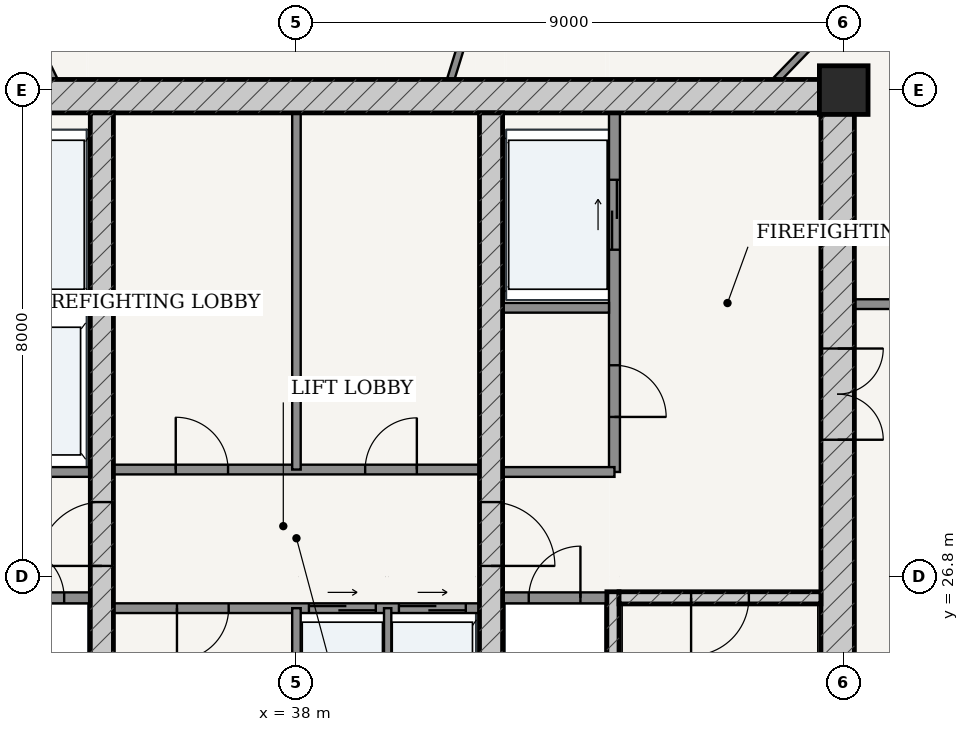
"""IFC4 building model, lengths in metres.
Left out: names, types, materials, properties, quantities, classifications, styles, units other than length and angle.
Written with IfcOpenShell. Run it as: python <this file> out.ifc"""

import sys

from ifc_helpers import new_model, si_unit, direction, frame, frame_2d, origin, origin_2d, place, context, subcontext, project, spatial, rectangle, extrude, source, transform, mapped, element, fill, save


model = new_model("IFC4")
c1 = context("Model", 3, precision=1e-05, world=origin(), true_north=direction((-0.2419218956, 0.970295726276)))
c2 = subcontext(c1, "Body", "Model", "MODEL_VIEW")
j1 = project(units=[si_unit("LENGTHUNIT", "METRE"), si_unit("PLANEANGLEUNIT", "RADIAN")], contexts=[c1])
p1 = place(None, origin())
s1 = spatial("IfcSite", under=j1, at=p1, CompositionType="ELEMENT")
p2 = place(p1, origin())
s2 = spatial("IfcBuilding", under=s1, at=p2, CompositionType="ELEMENT")
p3 = place(p2, frame((0.0, 0.0, 270.7)))
s3 = spatial("IfcBuildingStorey", under=s2, at=p3, CompositionType="ELEMENT", Elevation=270.7)
p4 = place(p3, frame((47.0, 34.8, 0.0), z_axis=(0.0, 0.0, 1.0), x_axis=(1.0, 0.0, 0.0)))
e1 = element("IfcColumn", 1, at=p4, inside=s3, PredefinedType="COLUMN", context=c2, shape_type="SweptSolid", body=[
    extrude(rectangle(XDim=0.8, YDim=0.8, at=origin_2d()), origin(), (0.0, 0.0, 1.0), 3.75),
])
p5 = place(p3, frame((28.825, 34.7, 0.0), z_axis=(0.0, 0.0, 1.0), x_axis=(1.0, 0.0, 0.0)))
e2 = element("IfcWall", 2, at=p5, inside=s3, PredefinedType="SHEAR", context=c2, shape_type="SweptSolid", body=[
    extrude(rectangle(XDim=18.35, YDim=0.55, at=frame_2d((9.175, 0.0))), origin(), (0.0, 0.0, 1.0), 3.49),
])
p6 = place(p3, frame((46.9, 19.175, 0.0), z_axis=(0.0, 0.0, 1.0), x_axis=(0.0, 1.0, 0.0)))
e3 = element("IfcWall", 3, at=p6, inside=s3, PredefinedType="SHEAR", context=c2, shape_type="SweptSolid", body=[
    extrude(rectangle(XDim=15.25, YDim=0.55, at=frame_2d((7.625, 0.0))), origin(), (0.0, 0.0, 1.0), 3.49),
])
p7 = place(p6, frame((9.875, 0.0, 0.0)))
e4 = element("IfcOpeningElement", 4, at=p7, cuts=e3, PredefinedType="OPENING", context=c2, shape_type="SweptSolid", body=[
    extrude(rectangle(XDim=1.5, YDim=2.2, at=frame_2d((0.75, 1.1))), frame((0.0, 0.285, 0.0), z_axis=(0.0, -1.0, 0.0), x_axis=(1.0, 0.0, 0.0)), (0.0, 0.0, 1.0), 0.57),
])
p8 = place(p3, frame((43.205, 19.175, 0.0), z_axis=(0.0, 0.0, 1.0), x_axis=(0.0, 1.0, 0.0)))
e5 = element("IfcWall", 5, at=p8, inside=s3, PredefinedType="SOLIDWALL", context=c2, shape_type="SweptSolid", body=[
    extrude(rectangle(XDim=7.375, YDim=0.2, at=frame_2d((3.688, 0.0))), origin(), (0.0, 0.0, 1.0), 3.49),
])
p9 = place(p3, frame((43.305, 26.45, 0.0), z_axis=(0.0, 0.0, 1.0), x_axis=(1.0, 0.0, 0.0)))
e6 = element("IfcWall", 6, at=p9, inside=s3, PredefinedType="SOLIDWALL", context=c2, shape_type="SweptSolid", body=[
    extrude(rectangle(XDim=3.32, YDim=0.2, at=frame_2d((1.66, 0.0))), origin(), (0.0, 0.0, 1.0), 3.49),
])
p10 = place(p9, frame((1.185, 0.0, 0.0)))
e7 = element("IfcOpeningElement", 7, at=p10, cuts=e6, PredefinedType="OPENING", context=c2, shape_type="SweptSolid", body=[
    extrude(rectangle(XDim=0.95, YDim=2.15, at=frame_2d((0.475, 1.075))), frame((0.0, 0.11, 0.0), z_axis=(0.0, -1.0, 0.0), x_axis=(1.0, 0.0, 0.0)), (0.0, 0.0, 1.0), 0.22),
])
p11 = place(p3, frame((34.8, 19.175, 0.0), z_axis=(0.0, 0.0, 1.0), x_axis=(0.0, 1.0, 0.0)))
e8 = element("IfcWall", 8, at=p11, inside=s3, PredefinedType="SHEAR", context=c2, shape_type="SweptSolid", body=[
    extrude(rectangle(XDim=15.25, YDim=0.38, at=frame_2d((7.625, 0.0))), origin(), (0.0, 0.0, 1.0), 3.49),
])
p12 = place(p11, frame((7.8, 0.0, 0.0)))
e9 = element("IfcOpeningElement", 9, at=p12, cuts=e8, PredefinedType="OPENING", context=c2, shape_type="SweptSolid", body=[
    extrude(rectangle(XDim=1.05, YDim=2.15, at=frame_2d((0.525, 1.075))), frame((0.0, 0.2, 0.0), z_axis=(0.0, -1.0, 0.0), x_axis=(1.0, 0.0, 0.0)), (0.0, 0.0, 1.0), 0.4),
])
p13 = place(p3, frame((41.2, 19.175, 0.0), z_axis=(0.0, 0.0, 1.0), x_axis=(0.0, 1.0, 0.0)))
e10 = element("IfcWall", 10, at=p13, inside=s3, PredefinedType="SHEAR", context=c2, shape_type="SweptSolid", body=[
    extrude(rectangle(XDim=15.25, YDim=0.38, at=frame_2d((7.625, 0.0))), origin(), (0.0, 0.0, 1.0), 3.49),
])
p14 = place(p13, frame((7.8, 0.0, 0.0)))
e11 = element("IfcOpeningElement", 11, at=p14, cuts=e10, PredefinedType="OPENING", context=c2, shape_type="SweptSolid", body=[
    extrude(rectangle(XDim=1.05, YDim=2.15, at=frame_2d((0.525, 1.075))), frame((0.0, 0.2, 0.0), z_axis=(0.0, -1.0, 0.0), x_axis=(1.0, 0.0, 0.0)), (0.0, 0.0, 1.0), 0.4),
])
p15 = place(p3, frame((32.9, 26.45, 0.0), z_axis=(0.0, 0.0, 1.0), x_axis=(1.0, 0.0, 0.0)))
e12 = element("IfcWall", 12, at=p15, inside=s3, PredefinedType="PARTITIONING", context=c2, shape_type="SweptSolid", body=[
    extrude(rectangle(XDim=1.71, YDim=0.18, at=frame_2d((0.855, 0.0))), origin(), (0.0, 0.0, 1.0), 3.49),
])
p16 = place(p15, frame((0.43, 0.0, 0.0)))
e13 = element("IfcOpeningElement", 13, at=p16, cuts=e12, PredefinedType="OPENING", context=c2, shape_type="SweptSolid", body=[
    extrude(rectangle(XDim=0.85, YDim=2.1, at=frame_2d((0.425, 1.05))), frame((0.0, 0.1, 0.0), z_axis=(0.0, -1.0, 0.0), x_axis=(1.0, 0.0, 0.0)), (0.0, 0.0, 1.0), 0.2),
])
p17 = place(p3, frame((41.39, 26.45, 0.0), z_axis=(0.0, 0.0, 1.0), x_axis=(1.0, 0.0, 0.0)))
e14 = element("IfcWall", 14, at=p17, inside=s3, PredefinedType="PARTITIONING", context=c2, shape_type="SweptSolid", body=[
    extrude(rectangle(XDim=1.71, YDim=0.18, at=frame_2d((0.855, 0.0))), origin(), (0.0, 0.0, 1.0), 3.49),
])
p18 = place(p17, frame((0.43, 0.0, 0.0)))
e15 = element("IfcOpeningElement", 15, at=p18, cuts=e14, PredefinedType="OPENING", context=c2, shape_type="SweptSolid", body=[
    extrude(rectangle(XDim=0.85, YDim=2.1, at=frame_2d((0.425, 1.05))), frame((0.0, 0.1, 0.0), z_axis=(0.0, -1.0, 0.0), x_axis=(1.0, 0.0, 0.0)), (0.0, 0.0, 1.0), 0.2),
])
p19 = place(p3, frame((32.86, 31.22, 0.0), z_axis=(0.0, 0.0, 1.0), x_axis=(1.0, 0.0, 0.0)))
e16 = element("IfcWall", 16, at=p19, inside=s3, PredefinedType="PARTITIONING", context=c2, shape_type="SweptSolid", body=[
    extrude(rectangle(XDim=1.75, YDim=0.16, at=frame_2d((0.875, 0.0))), origin(), (0.0, 0.0, 1.0), 3.49),
])
p20 = place(p3, frame((32.77, 28.52, 0.0), z_axis=(0.0, 0.0, 1.0), x_axis=(1.0, 0.0, 0.0)))
e17 = element("IfcWall", 17, at=p20, inside=s3, PredefinedType="PARTITIONING", context=c2, shape_type="SweptSolid", body=[
    extrude(rectangle(XDim=1.84, YDim=0.16, at=frame_2d((0.92, 0.0))), origin(), (0.0, 0.0, 1.0), 3.49),
])
p21 = place(p3, frame((43.23, 28.52, 0.0), z_axis=(0.0, 0.0, 1.0), x_axis=(0.0, 1.0, 0.0)))
e18 = element("IfcWall", 18, at=p21, inside=s3, PredefinedType="PARTITIONING", context=c2, shape_type="SweptSolid", body=[
    extrude(rectangle(XDim=5.905, YDim=0.18, at=frame_2d((2.953, 0.0))), origin(), (0.0, 0.0, 1.0), 3.49),
])
p22 = place(p21, frame((0.905, 0.0, 0.0)))
e19 = element("IfcOpeningElement", 19, at=p22, cuts=e18, PredefinedType="OPENING", context=c2, shape_type="SweptSolid", body=[
    extrude(rectangle(XDim=0.85, YDim=2.1, at=frame_2d((0.425, 1.05))), frame((0.0, 0.1, 0.0), z_axis=(0.0, -1.0, 0.0), x_axis=(1.0, 0.0, 0.0)), (0.0, 0.0, 1.0), 0.2),
])
p23 = place(p21, frame((3.655, 0.0, 0.0)))
e20 = element("IfcOpeningElement", 20, at=p23, cuts=e18, PredefinedType="OPENING", context=c2, shape_type="SweptSolid", body=[
    extrude(rectangle(XDim=1.15, YDim=2.2, at=frame_2d((0.575, 1.1))), frame((0.0, 0.1, 0.0), z_axis=(0.0, -1.0, 0.0), x_axis=(1.0, 0.0, 0.0)), (0.0, 0.0, 1.0), 0.2),
])
p24 = place(p3, frame((41.39, 31.22, 0.0), z_axis=(0.0, 0.0, 1.0), x_axis=(1.0, 0.0, 0.0)))
e21 = element("IfcWall", 21, at=p24, inside=s3, PredefinedType="PARTITIONING", context=c2, shape_type="SweptSolid", body=[
    extrude(rectangle(XDim=1.75, YDim=0.16, at=frame_2d((0.875, 0.0))), origin(), (0.0, 0.0, 1.0), 3.49),
])
p25 = place(p3, frame((41.39, 28.52, 0.0), z_axis=(0.0, 0.0, 1.0), x_axis=(1.0, 0.0, 0.0)))
e22 = element("IfcWall", 22, at=p25, inside=s3, PredefinedType="PARTITIONING", context=c2, shape_type="SweptSolid", body=[
    extrude(rectangle(XDim=1.84, YDim=0.16, at=frame_2d((0.92, 0.0))), origin(), (0.0, 0.0, 1.0), 3.49),
])
p26 = place(p3, frame((34.99, 28.56, 0.0), z_axis=(0.0, 0.0, 1.0), x_axis=(1.0, 0.0, 0.0)))
e23 = element("IfcWall", 23, at=p26, inside=s3, PredefinedType="PARTITIONING", context=c2, shape_type="SweptSolid", body=[
    extrude(rectangle(XDim=6.02, YDim=0.16, at=frame_2d((3.01, 0.0))), origin(), (0.0, 0.0, 1.0), 3.49),
])
p27 = place(p26, frame((1.025, 0.0, 0.0)))
e24 = element("IfcOpeningElement", 24, at=p27, cuts=e23, PredefinedType="OPENING", context=c2, shape_type="SweptSolid", body=[
    extrude(rectangle(XDim=0.86, YDim=2.1, at=frame_2d((0.43, 1.05))), frame((0.0, 0.09, 0.0), z_axis=(0.0, -1.0, 0.0), x_axis=(1.0, 0.0, 0.0)), (0.0, 0.0, 1.0), 0.18),
])
p28 = place(p26, frame((4.14, 0.0, 0.0)))
e25 = element("IfcOpeningElement", 25, at=p28, cuts=e23, PredefinedType="OPENING", context=c2, shape_type="SweptSolid", body=[
    extrude(rectangle(XDim=0.85, YDim=2.1, at=frame_2d((0.425, 1.05))), frame((0.0, 0.09, 0.0), z_axis=(0.0, -1.0, 0.0), x_axis=(1.0, 0.0, 0.0)), (0.0, 0.0, 1.0), 0.18),
])
p29 = place(p3, frame((38.0, 28.56, 0.0), z_axis=(0.0, 0.0, 1.0), x_axis=(0.0, 1.0, 0.0)))
e26 = element("IfcWall", 26, at=p29, inside=s3, PredefinedType="PARTITIONING", context=c2, shape_type="SweptSolid", body=[
    extrude(rectangle(XDim=5.865, YDim=0.14, at=frame_2d((2.933, 0.0))), origin(), (0.0, 0.0, 1.0), 3.49),
])
p30 = place(p3, frame((34.99, 26.28, 0.0), z_axis=(0.0, 0.0, 1.0), x_axis=(1.0, 0.0, 0.0)))
e27 = element("IfcWall", 27, at=p30, inside=s3, PredefinedType="PARTITIONING", context=c2, shape_type="SweptSolid", body=[
    extrude(rectangle(XDim=6.02, YDim=0.16, at=frame_2d((3.01, 0.0))), origin(), (0.0, 0.0, 1.0), 3.49),
])
p31 = place(p30, frame((1.045, 0.0, 0.0)))
e28 = element("IfcOpeningElement", 28, at=p31, cuts=e27, PredefinedType="OPENING", context=c2, shape_type="SweptSolid", body=[
    extrude(rectangle(XDim=0.85, YDim=2.1, at=frame_2d((0.425, 1.05))), frame((0.0, 0.09, 0.0), z_axis=(0.0, -1.0, 0.0), x_axis=(1.0, 0.0, 0.0)), (0.0, 0.0, 1.0), 0.18),
])
p32 = place(p30, frame((3.215, 0.0, 0.0)))
e29 = element("IfcOpeningElement", 29, at=p32, cuts=e27, PredefinedType="OPENING", context=c2, shape_type="SweptSolid", body=[
    extrude(rectangle(XDim=1.1, YDim=2.2, at=frame_2d((0.55, 1.1))), frame((0.0, 0.09, 0.0), z_axis=(0.0, -1.0, 0.0), x_axis=(1.0, 0.0, 0.0)), (0.0, 0.0, 1.0), 0.18),
])
p33 = place(p30, frame((4.695, 0.0, 0.0)))
e30 = element("IfcOpeningElement", 30, at=p33, cuts=e27, PredefinedType="OPENING", context=c2, shape_type="SweptSolid", body=[
    extrude(rectangle(XDim=1.1, YDim=2.2, at=frame_2d((0.55, 1.1))), frame((0.0, 0.09, 0.0), z_axis=(0.0, -1.0, 0.0), x_axis=(1.0, 0.0, 0.0)), (0.0, 0.0, 1.0), 0.18),
])
p34 = place(p3, frame((38.0, 23.72, 0.0), z_axis=(0.0, 0.0, 1.0), x_axis=(0.0, 1.0, 0.0)))
e31 = element("IfcWall", 31, at=p34, inside=s3, PredefinedType="PARTITIONING", context=c2, shape_type="SweptSolid", body=[
    extrude(rectangle(XDim=2.56, YDim=0.14, at=frame_2d((1.28, 0.0))), origin(), (0.0, 0.0, 1.0), 3.49),
])
p35 = place(p3, frame((39.5, 23.72, 0.0), z_axis=(0.0, 0.0, 1.0), x_axis=(0.0, 1.0, 0.0)))
e32 = element("IfcWall", 32, at=p35, inside=s3, PredefinedType="PARTITIONING", context=c2, shape_type="SweptSolid", body=[
    extrude(rectangle(XDim=2.56, YDim=0.12, at=frame_2d((1.28, 0.0))), origin(), (0.0, 0.0, 1.0), 3.49),
])
p36 = place(p3, frame((47.175, 31.28, 0.0), z_axis=(0.0, 0.0, 1.0), x_axis=(1.0, 0.0, 0.0)))
e33 = element("IfcWall", 33, at=p36, inside=s3, PredefinedType="PARTITIONING", context=c2, shape_type="SweptSolid", body=[
    extrude(rectangle(XDim=1.93, YDim=0.16, at=frame_2d((0.965, 0.0))), origin(), (0.0, 0.0, 1.0), 3.49),
])
p37 = place(p3, frame((45.903, 34.976, 0.0), z_axis=(0.0, 0.0, 1.0), x_axis=(0.69497417129, 0.719034700999, 0.0)))
e34 = element("IfcWall", 34, at=p37, inside=s3, PredefinedType="PARTITIONING", context=c2, shape_type="SweptSolid", body=[
    extrude(rectangle(XDim=3.775, YDim=0.12, at=frame_2d((1.887, 0.0))), origin(), (0.0, 0.0, 1.0), 3.015),
])
p38 = place(p37, frame((1.437, 0.0, 0.0)))
e35 = element("IfcOpeningElement", 35, at=p38, cuts=e34, PredefinedType="OPENING", context=c2, shape_type="SweptSolid", body=[
    extrude(rectangle(XDim=0.9, YDim=2.15, at=frame_2d((0.45, 1.075))), frame((0.0, 0.07, 0.0), z_axis=(0.0, -1.0, 0.0), x_axis=(1.0, 0.0, 0.0)), (0.0, 0.0, 1.0), 0.14),
])
p39 = place(p3, frame((40.537, 34.977, 0.0), z_axis=(0.0, 0.0, 1.0), x_axis=(0.29633127961, 0.95508521752, 0.0)))
e36 = element("IfcWall", 36, at=p39, inside=s3, PredefinedType="PARTITIONING", context=c2, shape_type="SweptSolid", body=[
    extrude(rectangle(XDim=2.826, YDim=0.12, at=frame_2d((1.413, 0.0))), origin(), (0.0, 0.0, 1.0), 2.575),
])
p40 = place(p39, frame((0.963, 0.0, 0.0)))
e37 = element("IfcOpeningElement", 37, at=p40, cuts=e36, PredefinedType="OPENING", context=c2, shape_type="SweptSolid", body=[
    extrude(rectangle(XDim=0.9, YDim=2.15, at=frame_2d((0.45, 1.075))), frame((0.0, 0.07, 0.0), z_axis=(0.0, -1.0, 0.0), x_axis=(1.0, 0.0, 0.0)), (0.0, 0.0, 1.0), 0.14),
])
p41 = place(p3, frame((34.008, 34.977, 0.0), z_axis=(0.0, 0.0, 1.0), x_axis=(-0.438717914863, 0.898624833386, 0.0)))
e38 = element("IfcWall", 38, at=p41, inside=s3, PredefinedType="PARTITIONING", context=c2, shape_type="SweptSolid", body=[
    extrude(rectangle(XDim=3.007, YDim=0.12, at=frame_2d((1.504, 0.0))), origin(), (0.0, 0.0, 1.0), 3.49),
])
p42 = place(p41, frame((1.054, 0.0, 0.0)))
e39 = element("IfcOpeningElement", 39, at=p42, cuts=e38, PredefinedType="OPENING", context=c2, shape_type="SweptSolid", body=[
    extrude(rectangle(XDim=0.9, YDim=2.15, at=frame_2d((0.45, 1.075))), frame((0.0, 0.07, 0.0), z_axis=(0.0, -1.0, 0.0), x_axis=(1.0, 0.0, 0.0)), (0.0, 0.0, 1.0), 0.14),
])
m1 = source(origin(), c2, "Body", "SweptSolid", [
    extrude(rectangle(XDim=1.5, YDim=2.2, at=frame_2d((0.75, 1.1))), frame((0.0, 0.025, 0.0), z_axis=(0.0, -1.0, 0.0), x_axis=(1.0, 0.0, 0.0)), (0.0, 0.0, 1.0), 0.05),
])
p43 = place(p7, frame((1.5, 0.0, 0.0), z_axis=(0.0, 0.0, 1.0), x_axis=(-1.0, 0.0, 0.0)))
e40 = element("IfcDoor", 40, at=p43, inside=s3, OperationType="DOUBLE_DOOR_SINGLE_SWING", PredefinedType="DOOR", context=c2, shape_type="MappedRepresentation", body=[
    mapped(m1, transform((0.0, 0.0, 0.0), scale=1.0)),
])
fill(e4, e40)
m2 = source(origin(), c2, "Body", "SweptSolid", [
    extrude(rectangle(XDim=1.05, YDim=2.15, at=frame_2d((0.525, 1.075))), frame((0.0, 0.025, 0.0), z_axis=(0.0, -1.0, 0.0), x_axis=(1.0, 0.0, 0.0)), (0.0, 0.0, 1.0), 0.05),
])
p44 = place(p12, origin())
e41 = element("IfcDoor", 41, at=p44, inside=s3, OperationType="SINGLE_SWING_LEFT", PredefinedType="DOOR", context=c2, shape_type="MappedRepresentation", body=[
    mapped(m2, transform((0.0, 0.0, 0.0), scale=1.0)),
])
fill(e9, e41)
p45 = place(p14, frame((1.05, 0.0, 0.0), z_axis=(0.0, 0.0, 1.0), x_axis=(-1.0, 0.0, 0.0)))
e42 = element("IfcDoor", 42, at=p45, inside=s3, OperationType="SINGLE_SWING_RIGHT", PredefinedType="DOOR", context=c2, shape_type="MappedRepresentation", body=[
    mapped(m2, transform((0.0, 0.0, 0.0), scale=1.0)),
])
fill(e11, e42)
m3 = source(origin(), c2, "Body", "SweptSolid", [
    extrude(rectangle(XDim=0.95, YDim=2.15, at=frame_2d((0.475, 1.075))), frame((0.0, 0.025, 0.0), z_axis=(0.0, -1.0, 0.0), x_axis=(1.0, 0.0, 0.0)), (0.0, 0.0, 1.0), 0.05),
])
p46 = place(p10, frame((0.95, 0.0, 0.0), z_axis=(0.0, 0.0, 1.0), x_axis=(-1.0, 0.0, 0.0)))
e43 = element("IfcDoor", 43, at=p46, inside=s3, OperationType="SINGLE_SWING_RIGHT", PredefinedType="DOOR", context=c2, shape_type="MappedRepresentation", body=[
    mapped(m3, transform((0.0, 0.0, 0.0), scale=1.0)),
])
fill(e7, e43)
m4 = source(origin(), c2, "Body", "SweptSolid", [
    extrude(rectangle(XDim=0.85, YDim=2.1, at=frame_2d((0.425, 1.05))), frame((0.0, 0.025, 0.0), z_axis=(0.0, -1.0, 0.0), x_axis=(1.0, 0.0, 0.0)), (0.0, 0.0, 1.0), 0.05),
])
p47 = place(p16, origin())
e44 = element("IfcDoor", 44, at=p47, inside=s3, OperationType="SINGLE_SWING_LEFT", PredefinedType="DOOR", context=c2, shape_type="MappedRepresentation", body=[
    mapped(m4, transform((0.0, 0.0, 0.0), scale=1.0)),
])
fill(e13, e44)
p48 = place(p18, origin())
e45 = element("IfcDoor", 45, at=p48, inside=s3, OperationType="SINGLE_SWING_RIGHT", PredefinedType="DOOR", context=c2, shape_type="MappedRepresentation", body=[
    mapped(m4, transform((0.0, 0.0, 0.0), scale=1.0)),
])
fill(e15, e45)
p49 = place(p22, frame((0.85, 0.0, 0.0), z_axis=(0.0, 0.0, 1.0), x_axis=(-1.0, 0.0, 0.0)))
e46 = element("IfcDoor", 46, at=p49, inside=s3, OperationType="SINGLE_SWING_RIGHT", PredefinedType="DOOR", context=c2, shape_type="MappedRepresentation", body=[
    mapped(m4, transform((0.0, 0.0, 0.0), scale=1.0)),
])
fill(e19, e46)
m5 = source(origin(), c2, "Body", "SweptSolid", [
    extrude(rectangle(XDim=0.86, YDim=2.1, at=frame_2d((0.43, 1.05))), frame((0.0, 0.025, 0.0), z_axis=(0.0, -1.0, 0.0), x_axis=(1.0, 0.0, 0.0)), (0.0, 0.0, 1.0), 0.05),
])
p50 = place(p27, origin())
e47 = element("IfcDoor", 47, at=p50, inside=s3, OperationType="SINGLE_SWING_LEFT", PredefinedType="DOOR", context=c2, shape_type="MappedRepresentation", body=[
    mapped(m5, transform((0.0, 0.0, 0.0), scale=1.0)),
])
fill(e24, e47)
p51 = place(p28, origin())
e48 = element("IfcDoor", 48, at=p51, inside=s3, OperationType="SINGLE_SWING_RIGHT", PredefinedType="DOOR", context=c2, shape_type="MappedRepresentation", body=[
    mapped(m4, transform((0.0, 0.0, 0.0), scale=1.0)),
])
fill(e25, e48)
p52 = place(p31, frame((0.85, 0.0, 0.0), z_axis=(0.0, 0.0, 1.0), x_axis=(-1.0, 0.0, 0.0)))
e49 = element("IfcDoor", 49, at=p52, inside=s3, OperationType="SINGLE_SWING_RIGHT", PredefinedType="DOOR", context=c2, shape_type="MappedRepresentation", body=[
    mapped(m4, transform((0.0, 0.0, 0.0), scale=1.0)),
])
fill(e28, e49)
m6 = source(origin(), c2, "Body", "SweptSolid", [
    extrude(rectangle(XDim=1.15, YDim=2.2, at=frame_2d((0.575, 1.1))), frame((0.0, 0.025, 0.0), z_axis=(0.0, -1.0, 0.0), x_axis=(1.0, 0.0, 0.0)), (0.0, 0.0, 1.0), 0.05),
])
p53 = place(p23, origin())
e50 = element("IfcDoor", 50, at=p53, inside=s3, OperationType="DOUBLE_DOOR_SLIDING", PredefinedType="DOOR", context=c2, shape_type="MappedRepresentation", body=[
    mapped(m6, transform((0.0, 0.0, 0.0), scale=1.0)),
])
fill(e20, e50)
m7 = source(origin(), c2, "Body", "SweptSolid", [
    extrude(rectangle(XDim=1.1, YDim=2.2, at=frame_2d((0.55, 1.1))), frame((0.0, 0.025, 0.0), z_axis=(0.0, -1.0, 0.0), x_axis=(1.0, 0.0, 0.0)), (0.0, 0.0, 1.0), 0.05),
])
p54 = place(p32, origin())
e51 = element("IfcDoor", 51, at=p54, inside=s3, OperationType="DOUBLE_DOOR_SLIDING", PredefinedType="DOOR", context=c2, shape_type="MappedRepresentation", body=[
    mapped(m7, transform((0.0, 0.0, 0.0), scale=1.0)),
])
fill(e29, e51)
p55 = place(p33, origin())
e52 = element("IfcDoor", 52, at=p55, inside=s3, OperationType="DOUBLE_DOOR_SLIDING", PredefinedType="DOOR", context=c2, shape_type="MappedRepresentation", body=[
    mapped(m7, transform((0.0, 0.0, 0.0), scale=1.0)),
])
fill(e30, e52)
save(model, sys.argv[1])
